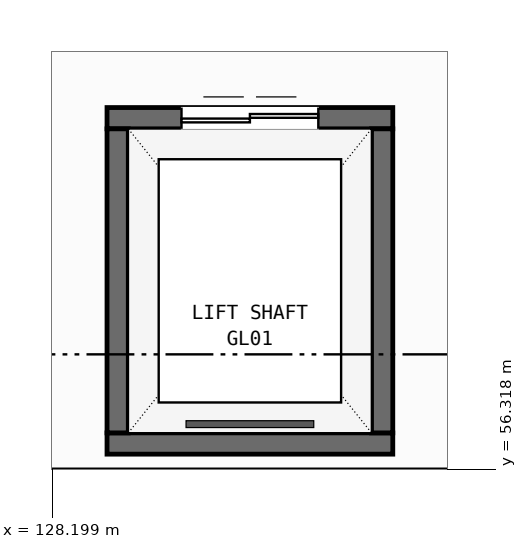
"""IFC4 building model, lengths in metres.
Left out: names, types, materials, properties, quantities, classifications, styles, units other than length and angle.
Written with IfcOpenShell. Run it as: python <this file> out.ifc"""

import sys

from ifc_helpers import new_model, si_unit, direction, frame, frame_2d, origin, place, context, subcontext, project, spatial, rectangle, extrude, element, fill, save


model = new_model("IFC4")
c1 = context("Model", 3, precision=1e-05, world=origin(), true_north=direction((0.0, 1.0)))
c2 = subcontext(c1, "Body", "Model", "MODEL_VIEW")
j1 = project(units=[si_unit("LENGTHUNIT", "METRE"), si_unit("PLANEANGLEUNIT", "RADIAN")], contexts=[c1])
p1 = place(None, origin())
s1 = spatial("IfcSite", under=j1, at=p1, CompositionType="ELEMENT")
p2 = place(p1, origin())
s2 = spatial("IfcBuilding", under=s1, at=p2, CompositionType="ELEMENT")
p3 = place(p2, frame((0.0, 0.0, -5.4)))
s3 = spatial("IfcBuildingStorey", under=s2, at=p3, CompositionType="ELEMENT", Elevation=-5.4)
p4 = place(p3, frame((128.92, 56.66, 0.0), z_axis=(0.0, 0.0, 1.0), x_axis=(1.0, 0.0, 0.0)))
e1 = element("IfcWall", 1, at=p4, inside=s3, PredefinedType="SHEAR", context=c2, shape_type="SweptSolid", body=[
    extrude(rectangle(XDim=3.76, YDim=0.28, at=frame_2d((1.88, 0.0))), origin(), (0.0, 0.0, 1.0), 5.4),
])
p5 = place(p3, frame((128.92, 60.94, 0.0), z_axis=(0.0, 0.0, 1.0), x_axis=(1.0, 0.0, 0.0)))
e2 = element("IfcWall", 2, at=p5, inside=s3, PredefinedType="SHEAR", context=c2, shape_type="SweptSolid", body=[
    extrude(rectangle(XDim=3.76, YDim=0.28, at=frame_2d((1.88, 0.0))), origin(), (0.0, 0.0, 1.0), 5.4),
])
p6 = place(p5, frame((0.98, 0.0, 0.0)))
e3 = element("IfcOpeningElement", 3, at=p6, cuts=e2, PredefinedType="OPENING", context=c2, shape_type="SweptSolid", body=[
    extrude(rectangle(XDim=1.8, YDim=2.3, at=frame_2d((0.9, 1.15))), frame((0.0, 0.15, 0.0), z_axis=(0.0, -1.0, 0.0), x_axis=(1.0, 0.0, 0.0)), (0.0, 0.0, 1.0), 0.3),
])
for number, where, z_axis, x_axis in (
    (4, (129.06, 56.8, 0.0), (0.0, 0.0, 1.0), (0.0, 1.0, 0.0)),
    (5, (132.54, 56.8, 0.0), (0.0, 0.0, 1.0), (0.0, 1.0, 0.0)),
):
    element("IfcWall", number, at=place(p3, frame(where, z_axis=z_axis, x_axis=x_axis)), inside=s3, PredefinedType="SHEAR", context=c2, shape_type="SweptSolid", body=[
        extrude(rectangle(XDim=4.0, YDim=0.28, at=frame_2d((2.0, 0.0))), origin(), (0.0, 0.0, 1.0), 5.4),
    ])
p7 = place(p6, origin())
e6 = element("IfcDoor", 6, at=p7, inside=s3, OperationType="DOUBLE_DOOR_SLIDING", PredefinedType="DOOR", context=c2, shape_type="SweptSolid", body=[
    extrude(rectangle(XDim=1.8, YDim=2.3, at=frame_2d((0.9, 1.15))), frame((0.0, 0.025, 0.0), z_axis=(0.0, -1.0, 0.0), x_axis=(1.0, 0.0, 0.0)), (0.0, 0.0, 1.0), 0.05),
])
fill(e3, e6)
save(model, sys.argv[1])
